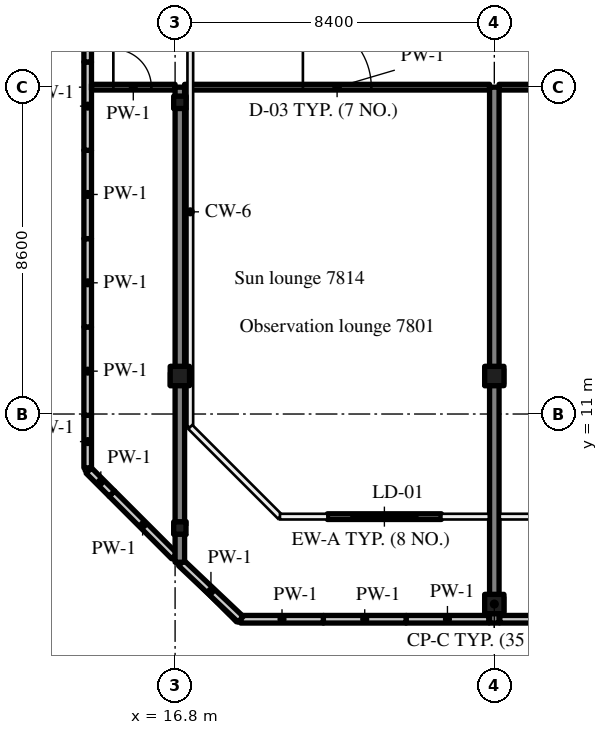
"""IFC4 building model, lengths in metres.
Left out: names, types, materials, properties, quantities, classifications, styles, units other than length and angle.
Written with IfcOpenShell. Run it as: python <this file> out.ifc"""

import sys

from ifc_helpers import new_model, si_unit, direction, frame, frame_2d, origin, origin_2d, place, context, subcontext, project, spatial, rectangle, hollow_circle, extrude, source, transform, mapped, element, fill, save


model = new_model("IFC4")
c1 = context("Model", 3, precision=1e-05, world=origin(), true_north=direction((0.0, 1.0)))
c2 = subcontext(c1, "Body", "Model", "MODEL_VIEW")
j1 = project(units=[si_unit("LENGTHUNIT", "METRE"), si_unit("PLANEANGLEUNIT", "RADIAN")], contexts=[c1])
p1 = place(None, origin())
s1 = spatial("IfcSite", under=j1, at=p1, CompositionType="ELEMENT")
p2 = place(p1, origin())
s2 = spatial("IfcBuilding", under=s1, at=p2, CompositionType="ELEMENT")
p3 = place(p2, frame((0.0, 0.0, 329.7)))
s3 = spatial("IfcBuildingStorey", under=s2, at=p3, CompositionType="ELEMENT", Elevation=329.7)
m1 = source(origin(), c2, "Body", "SweptSolid", [
    extrude(rectangle(XDim=12.5, YDim=0.25, at=frame_2d((6.25, 0.0))), origin(), (0.0, 0.0, 1.0), 4.72),
])
p4 = place(p3, frame((16.925, 7.1, 0.0), z_axis=(0.0, 0.0, 1.0), x_axis=(0.0, 1.0, 0.0)))
e1 = element("IfcWall", 1, at=p4, inside=s3, PredefinedType="SHEAR", context=c2, shape_type="MappedRepresentation", body=[
    mapped(m1, transform((0.0, 0.0, 0.0), scale=1.0)),
])
m2 = source(origin(), c2, "Body", "SweptSolid", [
    extrude(rectangle(XDim=14.1, YDim=0.25, at=frame_2d((7.05, 0.0))), origin(), (0.0, 0.0, 1.0), 4.72),
])
p5 = place(p3, frame((25.2, 5.5, 0.0), z_axis=(0.0, 0.0, 1.0), x_axis=(0.0, 1.0, 0.0)))
e2 = element("IfcWall", 2, at=p5, inside=s3, PredefinedType="SHEAR", context=c2, shape_type="MappedRepresentation", body=[
    mapped(m2, transform((0.0, 0.0, 0.0), scale=1.0)),
])
m3 = source(origin(), c2, "Body", "SweptSolid", [
    extrude(hollow_circle(Radius=0.254, WallThickness=0.02, at=origin_2d()), origin(), (0.0, 0.0, 1.0), 4.4),
])
for number, where, z_axis, x_axis in (
    (3, (25.2, 6.0, 5.0), (0.0, 0.0, 1.0), (1.0, 0.0, 0.0)),
    (4, (16.925, 12.0, 5.0), (0.0, 0.0, 1.0), (1.0, 0.0, 0.0)),
    (5, (25.2, 12.0, 5.0), (0.0, 0.0, 1.0), (1.0, 0.0, 0.0)),
):
    element("IfcColumn", number, at=place(p3, frame(where, z_axis=z_axis, x_axis=x_axis)), inside=s3, PredefinedType="COLUMN", context=c2, shape_type="MappedRepresentation", body=[
        mapped(m3, transform((0.0, 0.0, 0.0), scale=1.0)),
    ])
m4 = source(origin(), c2, "Body", "SweptSolid", [
    extrude(hollow_circle(Radius=0.162, WallThickness=0.012, at=origin_2d()), origin(), (0.0, 0.0, 1.0), 4.4),
])
for number, where, z_axis, x_axis in (
    (6, (16.925, 8.0, 5.0), (0.0, 0.0, 1.0), (1.0, 0.0, 0.0)),
    (7, (16.925, 19.2, 5.0), (0.0, 0.0, 1.0), (1.0, 0.0, 0.0)),
):
    element("IfcColumn", number, at=place(p3, frame(where, z_axis=z_axis, x_axis=x_axis)), inside=s3, PredefinedType="COLUMN", context=c2, shape_type="MappedRepresentation", body=[
        mapped(m4, transform((0.0, 0.0, 0.0), scale=1.0)),
    ])
m5 = source(origin(), c2, "Body", "SweptSolid", [
    extrude(rectangle(XDim=2.324, YDim=0.2, at=frame_2d((1.162, 0.0))), origin(), (0.0, 0.0, 1.0), 1.1),
])
p6 = place(p3, frame((16.78, 7.261, 0.0), z_axis=(0.0, 0.0, 1.0), x_axis=(-0.707106781187, 0.707106781187, 0.0)))
e8 = element("IfcWall", 8, at=p6, inside=s3, PredefinedType="PARAPET", context=c2, shape_type="MappedRepresentation", body=[
    mapped(m5, transform((0.0, 0.0, 0.0), scale=1.0)),
])
m6 = source(origin(), c2, "Body", "SweptSolid", [
    extrude(rectangle(XDim=0.859, YDim=0.2, at=frame_2d((0.429, 0.0))), origin(), (0.0, 0.0, 1.0), 1.1),
])
p7 = place(p3, frame((15.136, 8.905, 0.0), z_axis=(0.0, 0.0, 1.0), x_axis=(-0.707106781187, 0.707106781187, 0.0)))
e9 = element("IfcWall", 9, at=p7, inside=s3, PredefinedType="PARAPET", context=c2, shape_type="MappedRepresentation", body=[
    mapped(m6, transform((0.0, 0.0, 0.0), scale=1.0)),
])
m7 = source(origin(), c2, "Body", "SweptSolid", [
    extrude(rectangle(XDim=1.383, YDim=0.2, at=frame_2d((0.691, 0.0))), origin(), (0.0, 0.0, 1.0), 1.1),
])
p8 = place(p3, frame((14.5, 9.583, 0.0), z_axis=(0.0, 0.0, 1.0), x_axis=(0.0, 1.0, 0.0)))
e10 = element("IfcWall", 10, at=p8, inside=s3, PredefinedType="PARAPET", context=c2, shape_type="MappedRepresentation", body=[
    mapped(m7, transform((0.0, 0.0, 0.0), scale=1.0)),
])
m8 = source(origin(), c2, "Body", "SweptSolid", [
    extrude(rectangle(XDim=2.324, YDim=0.2, at=frame_2d((1.162, 0.0))), origin(), (0.0, 0.0, 1.0), 1.1),
])
p9 = place(p3, frame((14.5, 10.966, 0.0), z_axis=(0.0, 0.0, 1.0), x_axis=(0.0, 1.0, 0.0)))
e11 = element("IfcWall", 11, at=p9, inside=s3, PredefinedType="PARAPET", context=c2, shape_type="MappedRepresentation", body=[
    mapped(m8, transform((0.0, 0.0, 0.0), scale=1.0)),
])
p10 = place(p3, frame((14.5, 13.29, 0.0), z_axis=(0.0, 0.0, 1.0), x_axis=(0.0, 1.0, 0.0)))
e12 = element("IfcWall", 12, at=p10, inside=s3, PredefinedType="PARAPET", context=c2, shape_type="MappedRepresentation", body=[
    mapped(m5, transform((0.0, 0.0, 0.0), scale=1.0)),
])
for number, where, z_axis, x_axis in (
    (13, (14.5, 15.615, 0.0), (0.0, 0.0, 1.0), (0.0, 1.0, 0.0)),
    (14, (14.5, 17.939, 0.0), (0.0, 0.0, 1.0), (0.0, 1.0, 0.0)),
    (15, (14.5, 20.263, 0.0), (0.0, 0.0, 1.0), (0.0, 1.0, 0.0)),
):
    element("IfcWall", number, at=place(p3, frame(where, z_axis=z_axis, x_axis=x_axis)), inside=s3, PredefinedType="PARAPET", context=c2, shape_type="MappedRepresentation", body=[
        mapped(m8, transform((0.0, 0.0, 0.0), scale=1.0)),
    ])
m9 = source(origin(), c2, "Body", "SweptSolid", [
    extrude(rectangle(XDim=2.177, YDim=0.2, at=frame_2d((1.088, 0.0))), origin(), (0.0, 0.0, 1.0), 1.1),
])
p11 = place(p3, frame((25.055, 5.6, 0.0), z_axis=(0.0, 0.0, 1.0), x_axis=(-1.0, 0.0, 0.0)))
e16 = element("IfcWall", 16, at=p11, inside=s3, PredefinedType="PARAPET", context=c2, shape_type="MappedRepresentation", body=[
    mapped(m9, transform((0.0, 0.0, 0.0), scale=1.0)),
])
m10 = source(origin(), c2, "Body", "SweptSolid", [
    extrude(rectangle(XDim=2.177, YDim=0.2, at=frame_2d((1.088, 0.0))), origin(), (0.0, 0.0, 1.0), 1.1),
])
for number, where, z_axis, x_axis in (
    (17, (22.878, 5.6, 0.0), (0.0, 0.0, 1.0), (-1.0, 0.0, 0.0)),
    (18, (20.702, 5.6, 0.0), (0.0, 0.0, 1.0), (-1.0, 0.0, 0.0)),
):
    element("IfcWall", number, at=place(p3, frame(where, z_axis=z_axis, x_axis=x_axis)), inside=s3, PredefinedType="PARAPET", context=c2, shape_type="MappedRepresentation", body=[
        mapped(m10, transform((0.0, 0.0, 0.0), scale=1.0)),
    ])
m11 = source(origin(), c2, "Body", "SweptSolid", [
    extrude(rectangle(XDim=2.153, YDim=0.2, at=frame_2d((1.076, 0.0))), origin(), (0.0, 0.0, 1.0), 1.1),
])
p12 = place(p3, frame((18.525, 5.6, 0.0), z_axis=(0.0, 0.0, 1.0), x_axis=(-0.726232737351, 0.687448915338, 0.0)))
e19 = element("IfcWall", 19, at=p12, inside=s3, PredefinedType="PARAPET", context=c2, shape_type="MappedRepresentation", body=[
    mapped(m11, transform((0.0, 0.0, 0.0), scale=1.0)),
])
m12 = source(origin(), c2, "Body", "SweptSolid", [
    extrude(rectangle(XDim=2.028, YDim=0.2, at=frame_2d((1.014, 0.0))), origin(), (0.0, 0.0, 1.0), 1.1),
])
p13 = place(p3, frame((27.373, 5.6, 0.0), z_axis=(0.0, 0.0, 1.0), x_axis=(-1.0, 0.0, 0.0)))
e20 = element("IfcWall", 20, at=p13, inside=s3, PredefinedType="PARAPET", context=c2, shape_type="MappedRepresentation", body=[
    mapped(m12, transform((0.0, 0.0, 0.0), scale=1.0)),
])
m13 = source(origin(), c2, "Body", "SweptSolid", [
    extrude(rectangle(XDim=3.0, YDim=0.15, at=frame_2d((1.5, 0.0))), origin(), (0.0, 0.0, 1.0), 4.72),
])
p14 = place(p3, frame((20.807, 8.3, 0.0), z_axis=(0.0, 0.0, 1.0), x_axis=(1.0, 0.0, 0.0)))
e21 = element("IfcWall", 21, at=p14, inside=s3, PredefinedType="SOLIDWALL", context=c2, shape_type="MappedRepresentation", body=[
    mapped(m13, transform((0.0, 0.0, 0.0), scale=1.0)),
])
m14 = source(origin(), c2, "Body", "SweptSolid", [
    extrude(rectangle(XDim=1.8, YDim=2.4, at=frame_2d((0.9, 1.2))), frame((0.0, 0.085, 0.0), z_axis=(0.0, -1.0, 0.0), x_axis=(1.0, 0.0, 0.0)), (0.0, 0.0, 1.0), 0.17),
])
p15 = place(p14, frame((0.6, 0.0, 0.0)))
e22 = element("IfcOpeningElement", 22, at=p15, cuts=e21, PredefinedType="OPENING", context=c2, shape_type="MappedRepresentation", body=[
    mapped(m14, transform((0.0, 0.0, 0.0), scale=1.0)),
])
m15 = source(origin(), c2, "Body", "SweptSolid", [
    extrude(rectangle(XDim=8.025, YDim=0.15, at=frame_2d((4.012, 0.0))), origin(), (0.0, 0.0, 1.0), 4.02),
])
p16 = place(p3, frame((17.05, 19.6, 0.0), z_axis=(0.0, 0.0, 1.0), x_axis=(1.0, 0.0, 0.0)))
e23 = element("IfcWall", 23, at=p16, inside=s3, PredefinedType="PARTITIONING", context=c2, shape_type="MappedRepresentation", body=[
    mapped(m15, transform((0.0, 0.0, 0.0), scale=1.0)),
])
m16 = source(origin(), c2, "Body", "SweptSolid", [
    extrude(rectangle(XDim=1.8, YDim=2.1, at=frame_2d((0.9, 1.05))), frame((0.0, 0.085, 0.0), z_axis=(0.0, -1.0, 0.0), x_axis=(1.0, 0.0, 0.0)), (0.0, 0.0, 1.0), 0.17),
])
p17 = place(p16, frame((3.113, 0.0, 0.0)))
e24 = element("IfcOpeningElement", 24, at=p17, cuts=e23, PredefinedType="OPENING", context=c2, shape_type="MappedRepresentation", body=[
    mapped(m16, transform((0.0, 0.0, 0.0), scale=1.0)),
])
m17 = source(origin(), c2, "Body", "SweptSolid", [
    extrude(rectangle(XDim=8.15, YDim=0.15, at=frame_2d((4.075, 0.0))), origin(), (0.0, 0.0, 1.0), 4.02),
])
p18 = place(p3, frame((25.325, 19.6, 0.0), z_axis=(0.0, 0.0, 1.0), x_axis=(1.0, 0.0, 0.0)))
e25 = element("IfcWall", 25, at=p18, inside=s3, PredefinedType="PARTITIONING", context=c2, shape_type="MappedRepresentation", body=[
    mapped(m17, transform((0.0, 0.0, 0.0), scale=1.0)),
])
p19 = place(p18, frame((3.175, 0.0, 0.0)))
e26 = element("IfcOpeningElement", 26, at=p19, cuts=e25, PredefinedType="OPENING", context=c2, shape_type="MappedRepresentation", body=[
    mapped(m16, transform((0.0, 0.0, 0.0), scale=1.0)),
])
m18 = source(origin(), c2, "Body", "SweptSolid", [
    extrude(rectangle(XDim=2.2, YDim=0.15, at=frame_2d((1.1, 0.0))), origin(), (0.0, 0.0, 1.0), 4.02),
])
p20 = place(p3, frame((14.6, 19.6, 0.0), z_axis=(0.0, 0.0, 1.0), x_axis=(1.0, 0.0, 0.0)))
e27 = element("IfcWall", 27, at=p20, inside=s3, PredefinedType="PARTITIONING", context=c2, shape_type="MappedRepresentation", body=[
    mapped(m18, transform((0.0, 0.0, 0.0), scale=1.0)),
])
m19 = source(origin(), c2, "Body", "SweptSolid", [
    extrude(rectangle(XDim=1.0, YDim=2.1, at=frame_2d((0.5, 1.05))), frame((0.0, 0.085, 0.0), z_axis=(0.0, -1.0, 0.0), x_axis=(1.0, 0.0, 0.0)), (0.0, 0.0, 1.0), 0.17),
])
p21 = place(p20, frame((0.575, 0.0, 0.0)))
e28 = element("IfcOpeningElement", 28, at=p21, cuts=e27, PredefinedType="OPENING", context=c2, shape_type="MappedRepresentation", body=[
    mapped(m19, transform((0.0, 0.0, 0.0), scale=1.0)),
])
m20 = source(origin(), c2, "Body", "SweptSolid", [
    extrude(rectangle(XDim=1.8, YDim=2.4, at=frame_2d((0.9, 1.2))), frame((0.0, 0.025, 0.0), z_axis=(0.0, -1.0, 0.0), x_axis=(1.0, 0.0, 0.0)), (0.0, 0.0, 1.0), 0.05),
])
p22 = place(p15, origin())
e29 = element("IfcDoor", 29, at=p22, inside=s3, OperationType="SLIDING_TO_LEFT", PredefinedType="DOOR", context=c2, shape_type="MappedRepresentation", body=[
    mapped(m20, transform((0.0, 0.0, 0.0), scale=1.0)),
])
fill(e22, e29)
m21 = source(origin(), c2, "Body", "SweptSolid", [
    extrude(rectangle(XDim=1.8, YDim=2.1, at=frame_2d((0.9, 1.05))), frame((0.0, 0.025, 0.0), z_axis=(0.0, -1.0, 0.0), x_axis=(1.0, 0.0, 0.0)), (0.0, 0.0, 1.0), 0.05),
])
p23 = place(p17, origin())
e30 = element("IfcDoor", 30, at=p23, inside=s3, OperationType="DOUBLE_DOOR_SINGLE_SWING", PredefinedType="DOOR", context=c2, shape_type="MappedRepresentation", body=[
    mapped(m21, transform((0.0, 0.0, 0.0), scale=1.0)),
])
fill(e24, e30)
m22 = source(origin(), c2, "Body", "SweptSolid", [
    extrude(rectangle(XDim=1.0, YDim=2.1, at=frame_2d((0.5, 1.05))), frame((0.0, 0.025, 0.0), z_axis=(0.0, -1.0, 0.0), x_axis=(1.0, 0.0, 0.0)), (0.0, 0.0, 1.0), 0.05),
])
p24 = place(p21, origin())
e31 = element("IfcDoor", 31, at=p24, inside=s3, OperationType="SINGLE_SWING_LEFT", PredefinedType="DOOR", context=c2, shape_type="MappedRepresentation", body=[
    mapped(m22, transform((0.0, 0.0, 0.0), scale=1.0)),
])
fill(e28, e31)
save(model, sys.argv[1])
